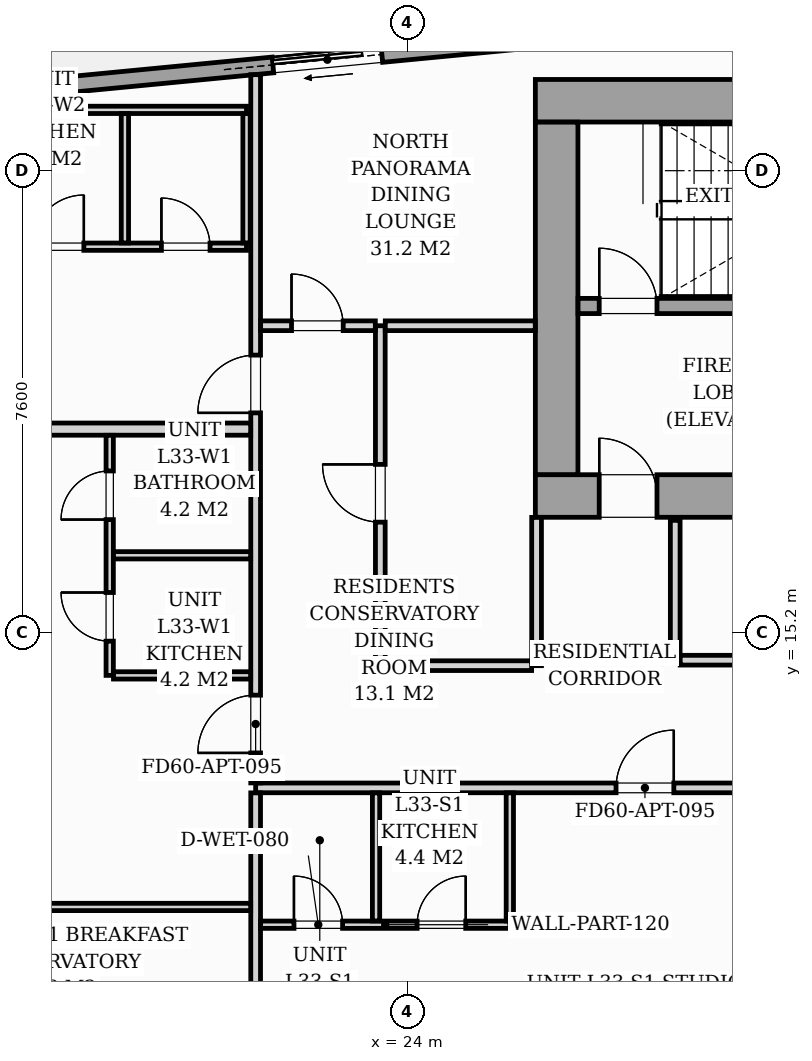
"""IFC4 building model, lengths in metres.
Left out: names, types, materials, properties, quantities, classifications, styles, units other than length and angle.
Written with IfcOpenShell. Run it as: python <this file> out.ifc"""

import sys

from ifc_helpers import new_model, si_unit, direction, frame, frame_2d, origin, origin_2d, place, context, subcontext, project, spatial, rectangle, i_section, extrude, source, transform, mapped, element, fill, save


model = new_model("IFC4")
c1 = context("Model", 3, precision=1e-05, world=origin(), true_north=direction((0.0, 1.0)))
c2 = subcontext(c1, "Body", "Model", "MODEL_VIEW")
j1 = project(units=[si_unit("LENGTHUNIT", "METRE"), si_unit("PLANEANGLEUNIT", "RADIAN")], contexts=[c1])
p1 = place(None, origin())
s1 = spatial("IfcSite", under=j1, at=p1, CompositionType="ELEMENT")
p2 = place(p1, origin())
s2 = spatial("IfcBuilding", under=s1, at=p2, CompositionType="ELEMENT")
p3 = place(p2, frame((0.0, 0.0, 116.2)))
s3 = spatial("IfcBuildingStorey", under=s2, at=p3, CompositionType="ELEMENT", Elevation=116.2)
m1 = source(origin(), c2, "Body", "SweptSolid", [
    extrude(i_section(OverallWidth=0.427, OverallDepth=0.483, WebThickness=0.051, FlangeThickness=0.082, FilletRadius=0.018, at=origin_2d()), origin(), (0.0, 0.0, 1.0), 3.196),
])
for number, where, z_axis, x_axis in (
    (1, (26.4, 17.4, 0.002), (0.0, 0.0, 1.0), (1.0, 0.0, 0.0)),
    (2, (26.4, 24.0, 0.002), (0.0, 0.0, 1.0), (1.0, 0.0, 0.0)),
):
    element("IfcColumn", number, at=place(p3, frame(where, z_axis=z_axis, x_axis=x_axis)), inside=s3, PredefinedType="PILASTER", context=c2, shape_type="MappedRepresentation", body=[
        mapped(m1, transform((0.0, 0.0, 0.0), scale=1.0)),
    ])
p4 = place(p3, frame((11.08, 23.508, 0.0), z_axis=(0.0, 0.0, 1.0), x_axis=(0.995396638587, 0.095841180552, 0.0)))
e3 = element("IfcWall", 3, at=p4, inside=s3, PredefinedType="STANDARD", context=c2, shape_type="SweptSolid", body=[
    extrude(rectangle(XDim=19.11, YDim=0.26, at=frame_2d((9.555, 0.0))), origin(), (0.0, 0.0, 1.0), 2.9),
])
p5 = place(p4, frame((10.754, 0.0, 0.0)))
e4 = element("IfcOpeningElement", 4, at=p5, cuts=e3, PredefinedType="OPENING", context=c2, shape_type="SweptSolid", body=[
    extrude(rectangle(XDim=1.8, YDim=2.06, at=frame_2d((0.9, 1.03))), frame((0.0, 0.14, 0.0), z_axis=(0.0, -1.0, 0.0), x_axis=(1.0, 0.0, 0.0)), (0.0, 0.0, 1.0), 0.28),
])
p6 = place(p4, frame((2.05, 0.0, 0.65)))
e5 = element("IfcOpeningElement", 5, at=p6, cuts=e3, PredefinedType="OPENING", context=c2, shape_type="SweptSolid", body=[
    extrude(rectangle(XDim=1.6, YDim=1.5, at=frame_2d((0.8, 0.75))), frame((0.0, 0.14, 0.0), z_axis=(0.0, -1.0, 0.0), x_axis=(1.0, 0.0, 0.0)), (0.0, 0.0, 1.0), 0.28),
])
p7 = place(p3, frame((26.1, 17.45, 0.0), z_axis=(0.0, 0.0, 1.0), x_axis=(1.0, 0.0, 0.0)))
e6 = element("IfcWall", 6, at=p7, inside=s3, PredefinedType="SHEAR", context=c2, shape_type="SweptSolid", body=[
    extrude(rectangle(XDim=19.8, YDim=0.7, at=frame_2d((9.9, 0.0))), origin(), (0.0, 0.0, 1.0), 3.2),
])
p8 = place(p7, frame((1.05, 0.0, 0.0)))
e7 = element("IfcOpeningElement", 7, at=p8, cuts=e6, PredefinedType="OPENING", context=c2, shape_type="SweptSolid", body=[
    extrude(rectangle(XDim=0.95, YDim=2.06, at=frame_2d((0.475, 1.03))), frame((0.0, 0.36, 0.0), z_axis=(0.0, -1.0, 0.0), x_axis=(1.0, 0.0, 0.0)), (0.0, 0.0, 1.0), 0.72),
])
p9 = place(p7, frame((9.48, 0.0, 0.0)))
e8 = element("IfcOpeningElement", 8, at=p9, cuts=e6, PredefinedType="OPENING", context=c2, shape_type="SweptSolid", body=[
    extrude(rectangle(XDim=0.85, YDim=2.0, at=frame_2d((0.425, 1.0))), frame((0.0, 0.36, 0.0), z_axis=(0.0, -1.0, 0.0), x_axis=(1.0, 0.0, 0.0)), (0.0, 0.0, 1.0), 0.72),
])
p10 = place(p7, frame((17.65, 0.0, 0.0)))
e9 = element("IfcOpeningElement", 9, at=p10, cuts=e6, PredefinedType="OPENING", context=c2, shape_type="SweptSolid", body=[
    extrude(rectangle(XDim=0.95, YDim=2.06, at=frame_2d((0.475, 1.03))), frame((0.0, 0.36, 0.0), z_axis=(0.0, -1.0, 0.0), x_axis=(1.0, 0.0, 0.0)), (0.0, 0.0, 1.0), 0.72),
])
p11 = place(p3, frame((26.1, 23.95, 0.0), z_axis=(0.0, 0.0, 1.0), x_axis=(1.0, 0.0, 0.0)))
e10 = element("IfcWall", 10, at=p11, inside=s3, PredefinedType="SHEAR", context=c2, shape_type="SweptSolid", body=[
    extrude(rectangle(XDim=19.8, YDim=0.7, at=frame_2d((9.9, 0.0))), origin(), (0.0, 0.0, 1.0), 3.2),
])
p12 = place(p3, frame((26.45, 17.802, 0.0), z_axis=(0.0, 0.0, 1.0), x_axis=(0.0, 1.0, 0.0)))
e11 = element("IfcWall", 11, at=p12, inside=s3, PredefinedType="SHEAR", context=c2, shape_type="SweptSolid", body=[
    extrude(rectangle(XDim=5.796, YDim=0.7, at=frame_2d((2.898, 0.0))), origin(), (0.0, 0.0, 1.0), 3.2),
])
p13 = place(p3, frame((26.802, 20.575, 0.0), z_axis=(0.0, 0.0, 1.0), x_axis=(1.0, 0.0, 0.0)))
e12 = element("IfcWall", 12, at=p13, inside=s3, PredefinedType="SOLIDWALL", context=c2, shape_type="SweptSolid", body=[
    extrude(rectangle(XDim=8.148, YDim=0.25, at=frame_2d((4.074, 0.0))), origin(), (0.0, 0.0, 1.0), 3.2),
])
p14 = place(p13, frame((0.348, 0.0, 0.0)))
e13 = element("IfcOpeningElement", 13, at=p14, cuts=e12, PredefinedType="OPENING", context=c2, shape_type="SweptSolid", body=[
    extrude(rectangle(XDim=0.95, YDim=2.06, at=frame_2d((0.475, 1.03))), frame((0.0, 0.135, 0.0), z_axis=(0.0, -1.0, 0.0), x_axis=(1.0, 0.0, 0.0)), (0.0, 0.0, 1.0), 0.27),
])
p15 = place(p3, frame((28.4, 14.75, 0.0), z_axis=(0.0, 0.0, 1.0), x_axis=(0.0, 1.0, 0.0)))
e14 = element("IfcWall", 14, at=p15, inside=s3, PredefinedType="PARTITIONING", context=c2, shape_type="SweptSolid", body=[
    extrude(rectangle(XDim=2.3, YDim=0.16, at=frame_2d((1.15, 0.0))), origin(), (0.0, 0.0, 1.0), 2.9),
])
p16 = place(p3, frame((28.482, 14.75, 0.0), z_axis=(0.0, 0.0, 1.0), x_axis=(1.0, 0.0, 0.0)))
e15 = element("IfcWall", 15, at=p16, inside=s3, PredefinedType="PARTITIONING", context=c2, shape_type="SweptSolid", body=[
    extrude(rectangle(XDim=4.516, YDim=0.16, at=frame_2d((2.258, 0.0))), origin(), (0.0, 0.0, 1.0), 2.9),
])
p17 = place(p16, frame((1.868, 0.0, 0.0)))
e16 = element("IfcOpeningElement", 16, at=p17, cuts=e15, PredefinedType="OPENING", context=c2, shape_type="SweptSolid", body=[
    extrude(rectangle(XDim=0.8, YDim=2.05, at=frame_2d((0.4, 1.025))), frame((0.0, 0.09, 0.0), z_axis=(0.0, -1.0, 0.0), x_axis=(1.0, 0.0, 0.0)), (0.0, 0.0, 1.0), 0.18),
])
p18 = place(p3, frame((21.5, 12.65, 0.0), z_axis=(0.0, 0.0, 1.0), x_axis=(1.0, 0.0, 0.0)))
e17 = element("IfcWall", 17, at=p18, inside=s3, PredefinedType="PARTITIONING", context=c2, shape_type="SweptSolid", body=[
    extrude(rectangle(XDim=26.2, YDim=0.16, at=frame_2d((13.1, 0.0))), origin(), (0.0, 0.0, 1.0), 2.9),
])
p19 = place(p18, frame((5.927, 0.0, 0.0)))
e18 = element("IfcOpeningElement", 18, at=p19, cuts=e17, PredefinedType="OPENING", context=c2, shape_type="SweptSolid", body=[
    extrude(rectangle(XDim=0.95, YDim=2.06, at=frame_2d((0.475, 1.03))), frame((0.0, 0.09, 0.0), z_axis=(0.0, -1.0, 0.0), x_axis=(1.0, 0.0, 0.0)), (0.0, 0.0, 1.0), 0.18),
])
p20 = place(p18, frame((10.575, 0.0, 0.0)))
e19 = element("IfcOpeningElement", 19, at=p20, cuts=e17, PredefinedType="OPENING", context=c2, shape_type="SweptSolid", body=[
    extrude(rectangle(XDim=0.95, YDim=2.06, at=frame_2d((0.475, 1.03))), frame((0.0, 0.09, 0.0), z_axis=(0.0, -1.0, 0.0), x_axis=(1.0, 0.0, 0.0)), (0.0, 0.0, 1.0), 0.18),
])
p21 = place(p18, frame((19.322, 0.0, 0.0)))
e20 = element("IfcOpeningElement", 20, at=p21, cuts=e17, PredefinedType="OPENING", context=c2, shape_type="SweptSolid", body=[
    extrude(rectangle(XDim=0.95, YDim=2.06, at=frame_2d((0.475, 1.03))), frame((0.0, 0.09, 0.0), z_axis=(0.0, -1.0, 0.0), x_axis=(1.0, 0.0, 0.0)), (0.0, 0.0, 1.0), 0.18),
])
p22 = place(p3, frame((21.5, 4.812, 0.0), z_axis=(0.0, 0.0, 1.0), x_axis=(0.0, 1.0, 0.0)))
e21 = element("IfcWall", 21, at=p22, inside=s3, PredefinedType="PARTITIONING", context=c2, shape_type="SweptSolid", body=[
    extrude(rectangle(XDim=7.756, YDim=0.16, at=frame_2d((3.878, 0.0))), origin(), (0.0, 0.0, 1.0), 2.9),
])
p23 = place(p3, frame((21.5, 12.732, 0.0), z_axis=(0.0, 0.0, 1.0), x_axis=(0.0, 1.0, 0.0)))
e22 = element("IfcWall", 22, at=p23, inside=s3, PredefinedType="PARTITIONING", context=c2, shape_type="SweptSolid", body=[
    extrude(rectangle(XDim=11.647, YDim=0.16, at=frame_2d((5.823, 0.0))), origin(), (0.0, 0.0, 1.0), 2.9),
])
p24 = place(p23, frame((0.493, 0.0, 0.0)))
e23 = element("IfcOpeningElement", 23, at=p24, cuts=e22, PredefinedType="OPENING", context=c2, shape_type="SweptSolid", body=[
    extrude(rectangle(XDim=0.95, YDim=2.06, at=frame_2d((0.475, 1.03))), frame((0.0, 0.09, 0.0), z_axis=(0.0, -1.0, 0.0), x_axis=(1.0, 0.0, 0.0)), (0.0, 0.0, 1.0), 0.18),
])
p25 = place(p23, frame((6.085, 0.0, 0.0)))
e24 = element("IfcOpeningElement", 24, at=p25, cuts=e22, PredefinedType="OPENING", context=c2, shape_type="SweptSolid", body=[
    extrude(rectangle(XDim=0.95, YDim=2.06, at=frame_2d((0.475, 1.03))), frame((0.0, 0.09, 0.0), z_axis=(0.0, -1.0, 0.0), x_axis=(1.0, 0.0, 0.0)), (0.0, 0.0, 1.0), 0.18),
])
p26 = place(p3, frame((21.582, 10.4, 0.0), z_axis=(0.0, 0.0, 1.0), x_axis=(1.0, 0.0, 0.0)))
e25 = element("IfcWall", 25, at=p26, inside=s3, PredefinedType="PARTITIONING", context=c2, shape_type="SweptSolid", body=[
    extrude(rectangle(XDim=4.098, YDim=0.12, at=frame_2d((2.049, 0.0))), origin(), (0.0, 0.0, 1.0), 2.9),
])
p27 = place(p26, frame((0.548, 0.0, 0.0)))
e26 = element("IfcOpeningElement", 26, at=p27, cuts=e25, PredefinedType="OPENING", context=c2, shape_type="SweptSolid", body=[
    extrude(rectangle(XDim=0.8, YDim=2.02, at=frame_2d((0.4, 1.01))), frame((0.0, 0.07, 0.0), z_axis=(0.0, -1.0, 0.0), x_axis=(1.0, 0.0, 0.0)), (0.0, 0.0, 1.0), 0.14),
])
p28 = place(p26, frame((2.573, 0.0, 0.0)))
e27 = element("IfcOpeningElement", 27, at=p28, cuts=e25, PredefinedType="OPENING", context=c2, shape_type="SweptSolid", body=[
    extrude(rectangle(XDim=0.8, YDim=2.0, at=frame_2d((0.4, 1.0))), frame((0.0, 0.07, 0.0), z_axis=(0.0, -1.0, 0.0), x_axis=(1.0, 0.0, 0.0)), (0.0, 0.0, 1.0), 0.14),
])
for number, where, z_axis, x_axis in (
    (28, (25.68, 10.462, 0.0), (0.0, 0.0, 1.0), (0.0, 1.0, 0.0)),
    (29, (23.48, 10.462, 0.0), (0.0, 0.0, 1.0), (0.0, 1.0, 0.0)),
):
    element("IfcWall", number, at=place(p3, frame(where, z_axis=z_axis, x_axis=x_axis)), inside=s3, PredefinedType="PARTITIONING", context=c2, shape_type="SweptSolid", body=[
        extrude(rectangle(XDim=2.106, YDim=0.12, at=frame_2d((1.053, 0.0))), origin(), (0.0, 0.0, 1.0), 2.9),
    ])
p29 = place(p3, frame((9.126, 18.55, 0.0), z_axis=(0.0, 0.0, 1.0), x_axis=(1.0, 0.0, 0.0)))
e30 = element("IfcWall", 30, at=p29, inside=s3, PredefinedType="PARTITIONING", context=c2, shape_type="SweptSolid", body=[
    extrude(rectangle(XDim=12.292, YDim=0.2, at=frame_2d((6.146, 0.0))), origin(), (0.0, 0.0, 1.0), 2.9),
])
p30 = place(p3, frame((19.1, 14.5, 0.0), z_axis=(0.0, 0.0, 1.0), x_axis=(0.0, 1.0, 0.0)))
e31 = element("IfcWall", 31, at=p30, inside=s3, PredefinedType="PARTITIONING", context=c2, shape_type="SweptSolid", body=[
    extrude(rectangle(XDim=3.948, YDim=0.12, at=frame_2d((1.974, 0.0))), origin(), (0.0, 0.0, 1.0), 2.9),
])
p31 = place(p30, frame((0.563, 0.0, 0.0)))
e32 = element("IfcOpeningElement", 32, at=p31, cuts=e31, PredefinedType="OPENING", context=c2, shape_type="SweptSolid", body=[
    extrude(rectangle(XDim=0.8, YDim=2.0, at=frame_2d((0.4, 1.0))), frame((0.0, 0.07, 0.0), z_axis=(0.0, -1.0, 0.0), x_axis=(1.0, 0.0, 0.0)), (0.0, 0.0, 1.0), 0.14),
])
p32 = place(p30, frame((2.562, 0.0, 0.0)))
e33 = element("IfcOpeningElement", 33, at=p32, cuts=e31, PredefinedType="OPENING", context=c2, shape_type="SweptSolid", body=[
    extrude(rectangle(XDim=0.8, YDim=2.02, at=frame_2d((0.4, 1.01))), frame((0.0, 0.07, 0.0), z_axis=(0.0, -1.0, 0.0), x_axis=(1.0, 0.0, 0.0)), (0.0, 0.0, 1.0), 0.14),
])
for number, where, z_axis, x_axis in (
    (34, (19.162, 16.475, 0.0), (0.0, 0.0, 1.0), (1.0, 0.0, 0.0)),
    (35, (19.162, 14.5, 0.0), (0.0, 0.0, 1.0), (1.0, 0.0, 0.0)),
):
    element("IfcWall", number, at=place(p3, frame(where, z_axis=z_axis, x_axis=x_axis)), inside=s3, PredefinedType="PARTITIONING", context=c2, shape_type="SweptSolid", body=[
        extrude(rectangle(XDim=2.256, YDim=0.12, at=frame_2d((1.128, 0.0))), origin(), (0.0, 0.0, 1.0), 2.9),
    ])
p33 = place(p3, frame((12.377, 10.692, 0.0), z_axis=(0.0, 0.0, 1.0), x_axis=(1.0, 0.0, 0.0)))
e36 = element("IfcWall", 36, at=p33, inside=s3, PredefinedType="PARTITIONING", context=c2, shape_type="SweptSolid", body=[
    extrude(rectangle(XDim=9.041, YDim=0.12, at=frame_2d((4.521, 0.0))), origin(), (0.0, 0.0, 1.0), 2.9),
])
p34 = place(p33, frame((4.096, 0.0, 0.0)))
e37 = element("IfcOpeningElement", 37, at=p34, cuts=e36, PredefinedType="OPENING", context=c2, shape_type="SweptSolid", body=[
    extrude(rectangle(XDim=0.85, YDim=2.05, at=frame_2d((0.425, 1.025))), frame((0.0, 0.07, 0.0), z_axis=(0.0, -1.0, 0.0), x_axis=(1.0, 0.0, 0.0)), (0.0, 0.0, 1.0), 0.14),
])
p35 = place(p3, frame((17.15, 21.55, 0.0), z_axis=(0.0, 0.0, 1.0), x_axis=(1.0, 0.0, 0.0)))
e38 = element("IfcWall", 38, at=p35, inside=s3, PredefinedType="PARTITIONING", context=c2, shape_type="SweptSolid", body=[
    extrude(rectangle(XDim=4.2, YDim=0.12, at=frame_2d((2.1, 0.0))), origin(), (0.0, 0.0, 1.0), 2.9),
])
p36 = place(p35, frame((0.675, 0.0, 0.0)))
e39 = element("IfcOpeningElement", 39, at=p36, cuts=e38, PredefinedType="OPENING", context=c2, shape_type="SweptSolid", body=[
    extrude(rectangle(XDim=0.85, YDim=2.05, at=frame_2d((0.425, 1.025))), frame((0.0, 0.07, 0.0), z_axis=(0.0, -1.0, 0.0), x_axis=(1.0, 0.0, 0.0)), (0.0, 0.0, 1.0), 0.14),
])
p37 = place(p35, frame((2.8, 0.0, 0.0)))
e40 = element("IfcOpeningElement", 40, at=p37, cuts=e38, PredefinedType="OPENING", context=c2, shape_type="SweptSolid", body=[
    extrude(rectangle(XDim=0.8, YDim=2.02, at=frame_2d((0.4, 1.01))), frame((0.0, 0.07, 0.0), z_axis=(0.0, -1.0, 0.0), x_axis=(1.0, 0.0, 0.0)), (0.0, 0.0, 1.0), 0.14),
])
p38 = place(p3, frame((17.15, 23.8, 0.0), z_axis=(0.0, 0.0, 1.0), x_axis=(1.0, 0.0, 0.0)))
e41 = element("IfcWall", 41, at=p38, inside=s3, PredefinedType="PARTITIONING", context=c2, shape_type="SweptSolid", body=[
    extrude(rectangle(XDim=4.2, YDim=0.12, at=frame_2d((2.1, 0.0))), origin(), (0.0, 0.0, 1.0), 2.27),
])
for number, where, z_axis, x_axis in (
    (42, (19.35, 21.612, 0.0), (0.0, 0.0, 1.0), (0.0, 1.0, 0.0)),
    (43, (21.35, 21.612, 0.0), (0.0, 0.0, 1.0), (0.0, 1.0, 0.0)),
):
    element("IfcWall", number, at=place(p3, frame(where, z_axis=z_axis, x_axis=x_axis)), inside=s3, PredefinedType="PARTITIONING", context=c2, shape_type="SweptSolid", body=[
        extrude(rectangle(XDim=2.126, YDim=0.12, at=frame_2d((1.063, 0.0))), origin(), (0.0, 0.0, 1.0), 2.9),
    ])
p39 = place(p3, frame((23.55, 14.66, 0.0), z_axis=(0.0, 0.0, 1.0), x_axis=(0.0, 1.0, 0.0)))
e44 = element("IfcWall", 44, at=p39, inside=s3, PredefinedType="PARTITIONING", context=c2, shape_type="SweptSolid", body=[
    extrude(rectangle(XDim=5.59, YDim=0.16, at=frame_2d((2.795, 0.0))), origin(), (0.0, 0.0, 1.0), 2.9),
])
p40 = place(p39, frame((2.36, 0.0, 0.0)))
e45 = element("IfcOpeningElement", 45, at=p40, cuts=e44, PredefinedType="OPENING", context=c2, shape_type="SweptSolid", body=[
    extrude(rectangle(XDim=0.95, YDim=2.06, at=frame_2d((0.475, 1.03))), frame((0.0, 0.09, 0.0), z_axis=(0.0, -1.0, 0.0), x_axis=(1.0, 0.0, 0.0)), (0.0, 0.0, 1.0), 0.18),
])
p41 = place(p3, frame((21.582, 20.25, 0.0), z_axis=(0.0, 0.0, 1.0), x_axis=(1.0, 0.0, 0.0)))
e46 = element("IfcWall", 46, at=p41, inside=s3, PredefinedType="PARTITIONING", context=c2, shape_type="SweptSolid", body=[
    extrude(rectangle(XDim=1.886, YDim=0.16, at=frame_2d((0.943, 0.0))), origin(), (0.0, 0.0, 1.0), 2.9),
])
p42 = place(p41, frame((0.508, 0.0, 0.0)))
e47 = element("IfcOpeningElement", 47, at=p42, cuts=e46, PredefinedType="OPENING", context=c2, shape_type="SweptSolid", body=[
    extrude(rectangle(XDim=0.85, YDim=2.0, at=frame_2d((0.425, 1.0))), frame((0.0, 0.09, 0.0), z_axis=(0.0, -1.0, 0.0), x_axis=(1.0, 0.0, 0.0)), (0.0, 0.0, 1.0), 0.18),
])
p43 = place(p3, frame((23.632, 20.25, 0.0), z_axis=(0.0, 0.0, 1.0), x_axis=(1.0, 0.0, 0.0)))
e48 = element("IfcWall", 48, at=p43, inside=s3, PredefinedType="PARTITIONING", context=c2, shape_type="SweptSolid", body=[
    extrude(rectangle(XDim=2.466, YDim=0.16, at=frame_2d((1.233, 0.0))), origin(), (0.0, 0.0, 1.0), 2.9),
])
p44 = place(p3, frame((26.12, 14.66, 0.0), z_axis=(0.0, 0.0, 1.0), x_axis=(0.0, 1.0, 0.0)))
e49 = element("IfcWall", 49, at=p44, inside=s3, PredefinedType="PARTITIONING", context=c2, shape_type="SweptSolid", body=[
    extrude(rectangle(XDim=2.438, YDim=0.16, at=frame_2d((1.219, 0.0))), origin(), (0.0, 0.0, 1.0), 2.9),
])
p45 = place(p3, frame((23.632, 14.66, 0.0), z_axis=(0.0, 0.0, 1.0), x_axis=(1.0, 0.0, 0.0)))
e50 = element("IfcWall", 50, at=p45, inside=s3, PredefinedType="PARTITIONING", context=c2, shape_type="SweptSolid", body=[
    extrude(rectangle(XDim=2.406, YDim=0.16, at=frame_2d((1.203, 0.0))), origin(), (0.0, 0.0, 1.0), 2.9),
])
m2 = source(origin(), c2, "Body", "SweptSolid", [
    extrude(rectangle(XDim=1.8, YDim=2.06, at=frame_2d((0.9, 1.03))), frame((0.0, 0.025, 0.0), z_axis=(0.0, -1.0, 0.0), x_axis=(1.0, 0.0, 0.0)), (0.0, 0.0, 1.0), 0.05),
])
p46 = place(p5, origin())
e51 = element("IfcDoor", 51, at=p46, inside=s3, OperationType="SLIDING_TO_LEFT", PredefinedType="DOOR", context=c2, shape_type="MappedRepresentation", body=[
    mapped(m2, transform((0.0, 0.0, 0.0), scale=1.0)),
])
fill(e4, e51)
m3 = source(origin(), c2, "Body", "SweptSolid", [
    extrude(rectangle(XDim=0.95, YDim=2.06, at=frame_2d((0.475, 1.03))), frame((0.0, 0.025, 0.0), z_axis=(0.0, -1.0, 0.0), x_axis=(1.0, 0.0, 0.0)), (0.0, 0.0, 1.0), 0.05),
])
p47 = place(p8, origin())
e52 = element("IfcDoor", 52, at=p47, inside=s3, OperationType="SINGLE_SWING_LEFT", PredefinedType="DOOR", context=c2, shape_type="MappedRepresentation", body=[
    mapped(m3, transform((0.0, 0.0, 0.0), scale=1.0)),
])
fill(e7, e52)
p48 = place(p14, origin())
e53 = element("IfcDoor", 53, at=p48, inside=s3, OperationType="SINGLE_SWING_LEFT", PredefinedType="DOOR", context=c2, shape_type="MappedRepresentation", body=[
    mapped(m3, transform((0.0, 0.0, 0.0), scale=1.0)),
])
fill(e13, e53)
m4 = source(origin(), c2, "Body", "SweptSolid", [
    extrude(rectangle(XDim=0.95, YDim=2.06, at=frame_2d((0.475, 1.03))), frame((0.0, 0.025, 0.0), z_axis=(0.0, -1.0, 0.0), x_axis=(1.0, 0.0, 0.0)), (0.0, 0.0, 1.0), 0.05),
])
p49 = place(p19, origin())
e54 = element("IfcDoor", 54, at=p49, inside=s3, OperationType="SINGLE_SWING_RIGHT", PredefinedType="DOOR", context=c2, shape_type="MappedRepresentation", body=[
    mapped(m4, transform((0.0, 0.0, 0.0), scale=1.0)),
])
fill(e18, e54)
m5 = source(origin(), c2, "Body", "SweptSolid", [
    extrude(rectangle(XDim=0.8, YDim=2.02, at=frame_2d((0.4, 1.01))), frame((0.0, 0.025, 0.0), z_axis=(0.0, -1.0, 0.0), x_axis=(1.0, 0.0, 0.0)), (0.0, 0.0, 1.0), 0.05),
])
p50 = place(p27, origin())
e55 = element("IfcDoor", 55, at=p50, inside=s3, OperationType="SINGLE_SWING_LEFT", PredefinedType="DOOR", context=c2, shape_type="MappedRepresentation", body=[
    mapped(m5, transform((0.0, 0.0, 0.0), scale=1.0)),
])
fill(e26, e55)
m6 = source(origin(), c2, "Body", "SweptSolid", [
    extrude(rectangle(XDim=0.8, YDim=2.0, at=frame_2d((0.4, 1.0))), frame((0.0, 0.025, 0.0), z_axis=(0.0, -1.0, 0.0), x_axis=(1.0, 0.0, 0.0)), (0.0, 0.0, 1.0), 0.05),
])
p51 = place(p28, origin())
e56 = element("IfcDoor", 56, at=p51, inside=s3, OperationType="SINGLE_SWING_RIGHT", PredefinedType="DOOR", context=c2, shape_type="MappedRepresentation", body=[
    mapped(m6, transform((0.0, 0.0, 0.0), scale=1.0)),
])
fill(e27, e56)
p52 = place(p24, origin())
e57 = element("IfcDoor", 57, at=p52, inside=s3, OperationType="SINGLE_SWING_LEFT", PredefinedType="DOOR", context=c2, shape_type="MappedRepresentation", body=[
    mapped(m4, transform((0.0, 0.0, 0.0), scale=1.0)),
])
fill(e23, e57)
p53 = place(p31, origin())
e58 = element("IfcDoor", 58, at=p53, inside=s3, OperationType="SINGLE_SWING_RIGHT", PredefinedType="DOOR", context=c2, shape_type="MappedRepresentation", body=[
    mapped(m6, transform((0.0, 0.0, 0.0), scale=1.0)),
])
fill(e32, e58)
p54 = place(p32, origin())
e59 = element("IfcDoor", 59, at=p54, inside=s3, OperationType="SINGLE_SWING_LEFT", PredefinedType="DOOR", context=c2, shape_type="MappedRepresentation", body=[
    mapped(m5, transform((0.0, 0.0, 0.0), scale=1.0)),
])
fill(e33, e59)
p55 = place(p25, origin())
e60 = element("IfcDoor", 60, at=p55, inside=s3, OperationType="SINGLE_SWING_LEFT", PredefinedType="DOOR", context=c2, shape_type="MappedRepresentation", body=[
    mapped(m4, transform((0.0, 0.0, 0.0), scale=1.0)),
])
fill(e24, e60)
m7 = source(origin(), c2, "Body", "SweptSolid", [
    extrude(rectangle(XDim=0.85, YDim=2.05, at=frame_2d((0.425, 1.025))), frame((0.0, 0.025, 0.0), z_axis=(0.0, -1.0, 0.0), x_axis=(1.0, 0.0, 0.0)), (0.0, 0.0, 1.0), 0.05),
])
p56 = place(p36, origin())
e61 = element("IfcDoor", 61, at=p56, inside=s3, OperationType="SINGLE_SWING_RIGHT", PredefinedType="DOOR", context=c2, shape_type="MappedRepresentation", body=[
    mapped(m7, transform((0.0, 0.0, 0.0), scale=1.0)),
])
fill(e39, e61)
p57 = place(p37, origin())
e62 = element("IfcDoor", 62, at=p57, inside=s3, OperationType="SINGLE_SWING_LEFT", PredefinedType="DOOR", context=c2, shape_type="MappedRepresentation", body=[
    mapped(m5, transform((0.0, 0.0, 0.0), scale=1.0)),
])
fill(e40, e62)
p58 = place(p40, origin())
e63 = element("IfcDoor", 63, at=p58, inside=s3, OperationType="SINGLE_SWING_RIGHT", PredefinedType="DOOR", context=c2, shape_type="MappedRepresentation", body=[
    mapped(m4, transform((0.0, 0.0, 0.0), scale=1.0)),
])
fill(e45, e63)
m8 = source(origin(), c2, "Body", "SweptSolid", [
    extrude(rectangle(XDim=0.85, YDim=2.0, at=frame_2d((0.425, 1.0))), frame((0.0, 0.025, 0.0), z_axis=(0.0, -1.0, 0.0), x_axis=(1.0, 0.0, 0.0)), (0.0, 0.0, 1.0), 0.05),
])
p59 = place(p42, origin())
e64 = element("IfcDoor", 64, at=p59, inside=s3, OperationType="SINGLE_SWING_LEFT", PredefinedType="DOOR", context=c2, shape_type="MappedRepresentation", body=[
    mapped(m8, transform((0.0, 0.0, 0.0), scale=1.0)),
])
fill(e47, e64)
save(model, sys.argv[1])
